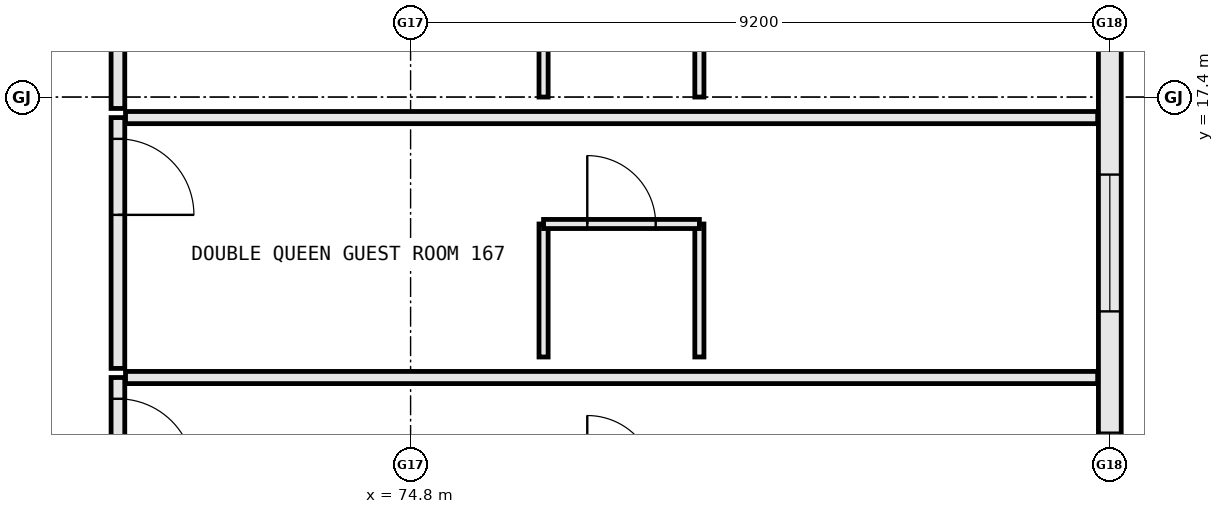
"""IFC4 building model, lengths in metres.
Left out: names, types, materials, properties, quantities, classifications, styles, units other than length and angle.
Written with IfcOpenShell. Run it as: python <this file> out.ifc"""

import sys

from ifc_helpers import new_model, si_unit, direction, frame, frame_2d, origin, place, context, subcontext, project, spatial, rectangle, extrude, element, fill, save


model = new_model("IFC4")
c1 = context("Model", 3, precision=1e-05, world=origin(), true_north=direction((0.0, 1.0)))
c2 = subcontext(c1, "Body", "Model", "MODEL_VIEW")
j1 = project(units=[si_unit("LENGTHUNIT", "METRE"), si_unit("PLANEANGLEUNIT", "RADIAN")], contexts=[c1])
p1 = place(None, origin())
s1 = spatial("IfcSite", under=j1, at=p1, CompositionType="ELEMENT")
p2 = place(p1, origin())
s2 = spatial("IfcBuilding", under=s1, at=p2, CompositionType="ELEMENT")
p3 = place(p2, frame((0.0, 0.0, 23.8)))
s3 = spatial("IfcBuildingStorey", under=s2, at=p3, CompositionType="ELEMENT", Elevation=23.8)
p4 = place(p3, frame((84.0, 10.458, 0.0), z_axis=(0.0, 0.0, 1.0), x_axis=(0.0, 1.0, 0.0)))
e1 = element("IfcWall", 1, at=p4, inside=s3, PredefinedType="STANDARD", context=c2, shape_type="SweptSolid", body=[
    extrude(rectangle(XDim=7.884, YDim=0.3, at=frame_2d((3.942, 0.0))), origin(), (0.0, 0.0, 1.0), 2.965),
])
p5 = place(p4, frame((0.726, 0.0, 0.85)))
e2 = element("IfcOpeningElement", 2, at=p5, cuts=e1, PredefinedType="OPENING", context=c2, shape_type="SweptSolid", body=[
    extrude(rectangle(XDim=1.8, YDim=1.85, at=frame_2d((0.9, 0.925))), frame((0.0, 0.162, 0.0), z_axis=(0.0, -1.0, 0.0), x_axis=(1.0, 0.0, 0.0)), (0.0, 0.0, 1.0), 0.324),
])
p6 = place(p4, frame((4.122, 0.0, 0.85)))
e3 = element("IfcOpeningElement", 3, at=p6, cuts=e1, PredefinedType="OPENING", context=c2, shape_type="SweptSolid", body=[
    extrude(rectangle(XDim=1.8, YDim=1.85, at=frame_2d((0.9, 0.925))), frame((0.0, 0.162, 0.0), z_axis=(0.0, -1.0, 0.0), x_axis=(1.0, 0.0, 0.0)), (0.0, 0.0, 1.0), 0.324),
])
p7 = place(p3, frame((70.95, 13.71, 0.0), z_axis=(0.0, 0.0, 1.0), x_axis=(0.0, -1.0, 0.0)))
e4 = element("IfcWall", 4, at=p7, inside=s3, PredefinedType="PARTITIONING", context=c2, shape_type="SweptSolid", body=[
    extrude(rectangle(XDim=3.3, YDim=0.18, at=frame_2d((1.65, 0.0))), origin(), (0.0, 0.0, 1.0), 3.55),
])
p8 = place(p7, frame((0.28, 0.0, 0.0)))
e5 = element("IfcOpeningElement", 5, at=p8, cuts=e4, PredefinedType="OPENING", context=c2, shape_type="SweptSolid", body=[
    extrude(rectangle(XDim=1.0, YDim=2.2, at=frame_2d((0.5, 1.1))), frame((0.0, 0.102, 0.0), z_axis=(0.0, -1.0, 0.0), x_axis=(1.0, 0.0, 0.0)), (0.0, 0.0, 1.0), 0.204),
])
p9 = place(p3, frame((71.05, 13.71, 0.0), z_axis=(0.0, 0.0, 1.0), x_axis=(1.0, 0.0, 0.0)))
e6 = element("IfcWall", 6, at=p9, inside=s3, PredefinedType="PARTITIONING", context=c2, shape_type="SweptSolid", body=[
    extrude(rectangle(XDim=12.79, YDim=0.16, at=frame_2d((6.395, 0.0))), origin(), (0.0, 0.0, 1.0), 3.55),
])
p10 = place(p3, frame((70.95, 17.13, 0.0), z_axis=(0.0, 0.0, 1.0), x_axis=(0.0, -1.0, 0.0)))
e7 = element("IfcWall", 7, at=p10, inside=s3, PredefinedType="PARTITIONING", context=c2, shape_type="SweptSolid", body=[
    extrude(rectangle(XDim=3.3, YDim=0.18, at=frame_2d((1.65, 0.0))), origin(), (0.0, 0.0, 1.0), 3.55),
])
p11 = place(p10, frame((0.28, 0.0, 0.0)))
e8 = element("IfcOpeningElement", 8, at=p11, cuts=e7, PredefinedType="OPENING", context=c2, shape_type="SweptSolid", body=[
    extrude(rectangle(XDim=1.0, YDim=2.2, at=frame_2d((0.5, 1.1))), frame((0.0, 0.102, 0.0), z_axis=(0.0, -1.0, 0.0), x_axis=(1.0, 0.0, 0.0)), (0.0, 0.0, 1.0), 0.204),
])
p12 = place(p3, frame((71.05, 17.13, 0.0), z_axis=(0.0, 0.0, 1.0), x_axis=(1.0, 0.0, 0.0)))
e9 = element("IfcWall", 9, at=p12, inside=s3, PredefinedType="PARTITIONING", context=c2, shape_type="SweptSolid", body=[
    extrude(rectangle(XDim=12.79, YDim=0.16, at=frame_2d((6.395, 0.0))), origin(), (0.0, 0.0, 1.0), 3.55),
])
for number, where, z_axis, x_axis in (
    (10, (76.55, 13.98, 0.0), (0.0, 0.0, 1.0), (0.0, 1.0, 0.0)),
    (11, (78.6, 13.98, 0.0), (0.0, 0.0, 1.0), (0.0, 1.0, 0.0)),
):
    element("IfcWall", number, at=place(p3, frame(where, z_axis=z_axis, x_axis=x_axis)), inside=s3, PredefinedType="PARTITIONING", context=c2, shape_type="SweptSolid", body=[
        extrude(rectangle(XDim=1.75, YDim=0.12, at=frame_2d((0.875, 0.0))), origin(), (0.0, 0.0, 1.0), 3.55),
    ])
p13 = place(p3, frame((76.55, 15.73, 0.0), z_axis=(0.0, 0.0, 1.0), x_axis=(1.0, 0.0, 0.0)))
e12 = element("IfcWall", 12, at=p13, inside=s3, PredefinedType="PARTITIONING", context=c2, shape_type="SweptSolid", body=[
    extrude(rectangle(XDim=2.05, YDim=0.12, at=frame_2d((1.025, 0.0))), origin(), (0.0, 0.0, 1.0), 3.55),
])
p14 = place(p13, frame((0.575, 0.0, 0.0)))
e13 = element("IfcOpeningElement", 13, at=p14, cuts=e12, PredefinedType="OPENING", context=c2, shape_type="SweptSolid", body=[
    extrude(rectangle(XDim=0.9, YDim=2.15, at=frame_2d((0.45, 1.075))), frame((0.0, 0.072, 0.0), z_axis=(0.0, -1.0, 0.0), x_axis=(1.0, 0.0, 0.0)), (0.0, 0.0, 1.0), 0.144),
])
p15 = place(p3, frame((70.95, 20.55, 0.0), z_axis=(0.0, 0.0, 1.0), x_axis=(0.0, -1.0, 0.0)))
e14 = element("IfcWall", 14, at=p15, inside=s3, PredefinedType="PARTITIONING", context=c2, shape_type="SweptSolid", body=[
    extrude(rectangle(XDim=3.3, YDim=0.18, at=frame_2d((1.65, 0.0))), origin(), (0.0, 0.0, 1.0), 3.55),
])
p16 = place(p15, frame((0.28, 0.0, 0.0)))
e15 = element("IfcOpeningElement", 15, at=p16, cuts=e14, PredefinedType="OPENING", context=c2, shape_type="SweptSolid", body=[
    extrude(rectangle(XDim=1.0, YDim=2.2, at=frame_2d((0.5, 1.1))), frame((0.0, 0.102, 0.0), z_axis=(0.0, -1.0, 0.0), x_axis=(1.0, 0.0, 0.0)), (0.0, 0.0, 1.0), 0.204),
])
for number, where, z_axis, x_axis in (
    (16, (76.55, 17.4, 0.0), (0.0, 0.0, 1.0), (0.0, 1.0, 0.0)),
    (17, (78.6, 17.4, 0.0), (0.0, 0.0, 1.0), (0.0, 1.0, 0.0)),
):
    element("IfcWall", number, at=place(p3, frame(where, z_axis=z_axis, x_axis=x_axis)), inside=s3, PredefinedType="PARTITIONING", context=c2, shape_type="SweptSolid", body=[
        extrude(rectangle(XDim=1.75, YDim=0.12, at=frame_2d((0.875, 0.0))), origin(), (0.0, 0.0, 1.0), 3.55),
    ])
p17 = place(p5, origin())
e18 = element("IfcWindow", 18, at=p17, inside=s3, PartitioningType="SINGLE_PANEL", PredefinedType="WINDOW", context=c2, shape_type="SweptSolid", body=[
    extrude(rectangle(XDim=1.8, YDim=1.85, at=frame_2d((0.9, 0.925))), frame((0.0, 0.03, 0.0), z_axis=(0.0, -1.0, 0.0), x_axis=(1.0, 0.0, 0.0)), (0.0, 0.0, 1.0), 0.06),
])
fill(e2, e18)
p18 = place(p6, origin())
e19 = element("IfcWindow", 19, at=p18, inside=s3, PartitioningType="SINGLE_PANEL", PredefinedType="WINDOW", context=c2, shape_type="SweptSolid", body=[
    extrude(rectangle(XDim=1.8, YDim=1.85, at=frame_2d((0.9, 0.925))), frame((0.0, 0.03, 0.0), z_axis=(0.0, -1.0, 0.0), x_axis=(1.0, 0.0, 0.0)), (0.0, 0.0, 1.0), 0.06),
])
fill(e3, e19)
p19 = place(p8, origin())
e20 = element("IfcDoor", 20, at=p19, inside=s3, OperationType="SINGLE_SWING_RIGHT", PredefinedType="DOOR", context=c2, shape_type="SweptSolid", body=[
    extrude(rectangle(XDim=1.0, YDim=2.2, at=frame_2d((0.5, 1.1))), frame((0.0, 0.025, 0.0), z_axis=(0.0, -1.0, 0.0), x_axis=(1.0, 0.0, 0.0)), (0.0, 0.0, 1.0), 0.05),
])
fill(e5, e20)
p20 = place(p11, origin())
e21 = element("IfcDoor", 21, at=p20, inside=s3, OperationType="SINGLE_SWING_RIGHT", PredefinedType="DOOR", context=c2, shape_type="SweptSolid", body=[
    extrude(rectangle(XDim=1.0, YDim=2.2, at=frame_2d((0.5, 1.1))), frame((0.0, 0.025, 0.0), z_axis=(0.0, -1.0, 0.0), x_axis=(1.0, 0.0, 0.0)), (0.0, 0.0, 1.0), 0.05),
])
fill(e8, e21)
p21 = place(p14, origin())
e22 = element("IfcDoor", 22, at=p21, inside=s3, OperationType="SINGLE_SWING_LEFT", PredefinedType="DOOR", context=c2, shape_type="SweptSolid", body=[
    extrude(rectangle(XDim=0.9, YDim=2.15, at=frame_2d((0.45, 1.075))), frame((0.0, 0.025, 0.0), z_axis=(0.0, -1.0, 0.0), x_axis=(1.0, 0.0, 0.0)), (0.0, 0.0, 1.0), 0.05),
])
fill(e13, e22)
save(model, sys.argv[1])
